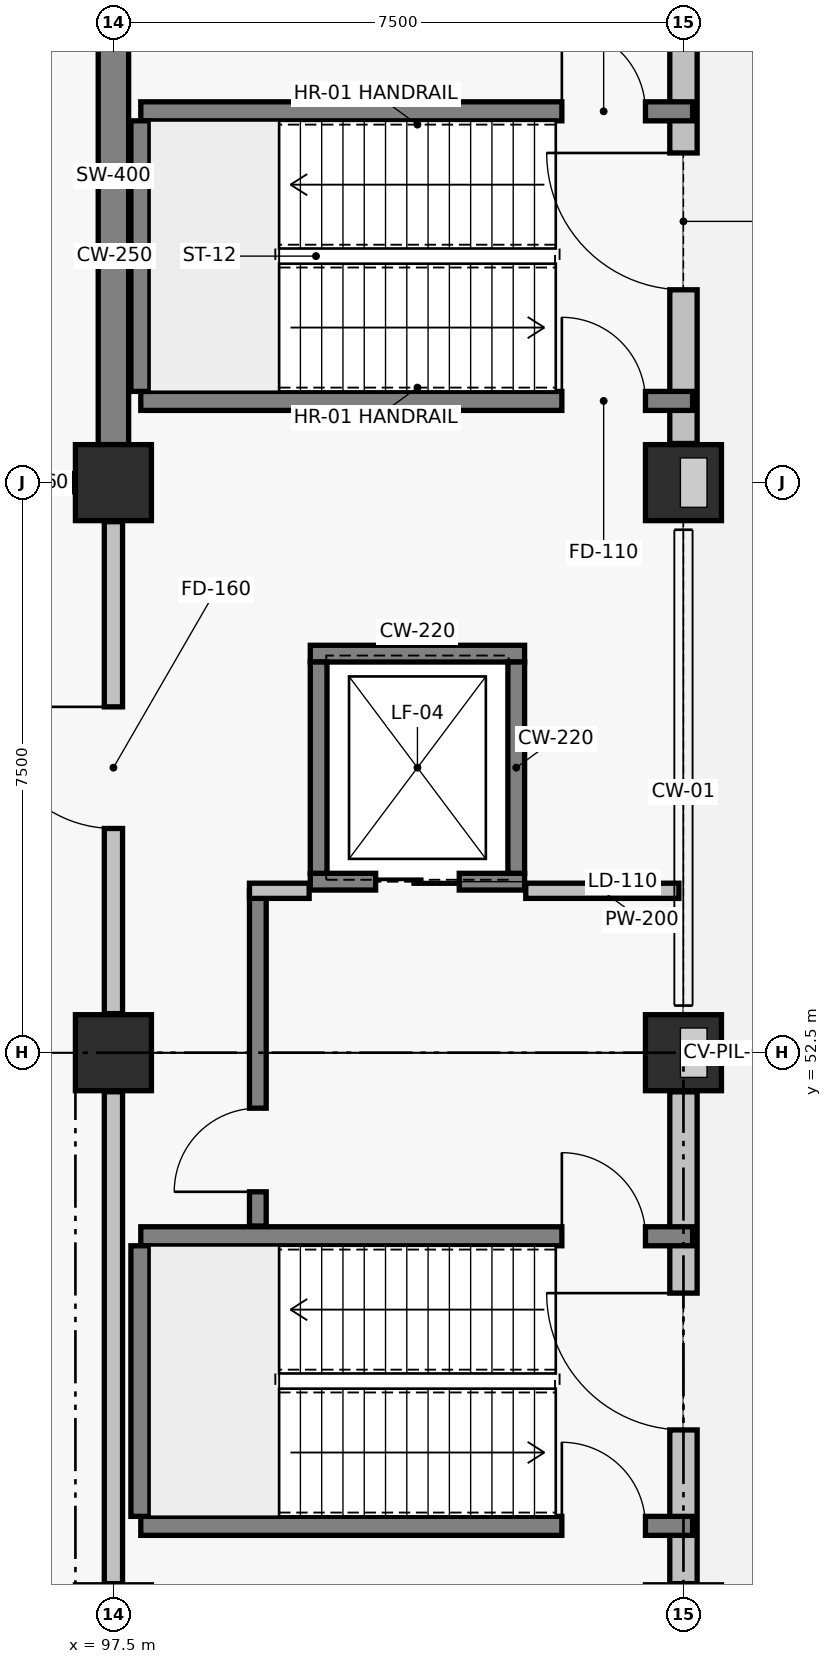
"""IFC4 building model, lengths in metres.
Left out: names, types, materials, properties, quantities, classifications, styles, units other than length and angle.
Written with IfcOpenShell. Run it as: python <this file> out.ifc"""

import sys

from ifc_helpers import new_model, si_unit, direction, frame, frame_2d, origin, origin_2d, place, context, subcontext, project, spatial, rectangle, extrude, element, fill, save


model = new_model("IFC4")
c1 = context("Model", 3, precision=1e-05, world=origin(), true_north=direction((0.0, 1.0)))
c2 = subcontext(c1, "Body", "Model", "MODEL_VIEW")
j1 = project(units=[si_unit("LENGTHUNIT", "METRE"), si_unit("PLANEANGLEUNIT", "RADIAN")], contexts=[c1])
p1 = place(None, origin())
s1 = spatial("IfcSite", under=j1, at=p1, CompositionType="ELEMENT")
p2 = place(p1, origin())
s2 = spatial("IfcBuilding", under=s1, at=p2, CompositionType="ELEMENT")
p3 = place(p2, origin())
s3 = spatial("IfcBuildingStorey", under=s2, at=p3, CompositionType="ELEMENT", Elevation=0.0)
for number, where, z_axis, x_axis in (
    (1, (97.5, 52.5, 0.0), (0.0, 0.0, 1.0), (1.0, 0.0, 0.0)),
    (2, (97.5, 60.0, 0.0), (0.0, 0.0, 1.0), (1.0, 0.0, 0.0)),
    (3, (105.0, 52.5, 0.0), (0.0, 0.0, 1.0), (1.0, 0.0, 0.0)),
    (4, (105.0, 60.0, 0.0), (0.0, 0.0, 1.0), (1.0, 0.0, 0.0)),
):
    element("IfcColumn", number, at=place(p3, frame(where, z_axis=z_axis, x_axis=x_axis)), inside=s3, PredefinedType="COLUMN", context=c2, shape_type="SweptSolid", body=[
        extrude(rectangle(XDim=1.0, YDim=1.0, at=origin_2d()), origin(), (0.0, 0.0, 1.0), 4.8),
    ])
p4 = place(p3, frame((97.5, 60.5, 0.0), z_axis=(0.0, 0.0, 1.0), x_axis=(0.0, 1.0, 0.0)))
e5 = element("IfcWall", 5, at=p4, inside=s3, PredefinedType="SHEAR", context=c2, shape_type="SweptSolid", body=[
    extrude(rectangle(XDim=6.5, YDim=0.4, at=frame_2d((3.25, 0.0))), origin(), (0.0, 0.0, 1.0), 3.6),
])
p5 = place(p3, frame((105.0, 45.515, 0.0), z_axis=(0.0, 0.0, 1.0), x_axis=(0.0, 1.0, 0.0)))
e6 = element("IfcWall", 6, at=p5, inside=s3, PredefinedType="SOLIDWALL", context=c2, shape_type="SweptSolid", body=[
    extrude(rectangle(XDim=6.47, YDim=0.36, at=frame_2d((3.235, 0.0))), origin(), (0.0, 0.0, 1.0), 3.57),
])
p6 = place(p5, frame((2.022, 0.0, 0.0)))
e7 = element("IfcOpeningElement", 7, at=p6, cuts=e6, PredefinedType="OPENING", context=c2, shape_type="SweptSolid", body=[
    extrude(rectangle(XDim=1.8, YDim=2.2, at=frame_2d((0.9, 1.1))), frame((0.0, 0.19, 0.0), z_axis=(0.0, -1.0, 0.0), x_axis=(1.0, 0.0, 0.0)), (0.0, 0.0, 1.0), 0.38),
])
p7 = place(p3, frame((105.0, 60.515, 0.0), z_axis=(0.0, 0.0, 1.0), x_axis=(0.0, 1.0, 0.0)))
e8 = element("IfcWall", 8, at=p7, inside=s3, PredefinedType="SOLIDWALL", context=c2, shape_type="SweptSolid", body=[
    extrude(rectangle(XDim=6.47, YDim=0.36, at=frame_2d((3.235, 0.0))), origin(), (0.0, 0.0, 1.0), 3.57),
])
p8 = place(p7, frame((2.022, 0.0, 0.0)))
e9 = element("IfcOpeningElement", 9, at=p8, cuts=e8, PredefinedType="OPENING", context=c2, shape_type="SweptSolid", body=[
    extrude(rectangle(XDim=1.8, YDim=2.2, at=frame_2d((0.9, 1.1))), frame((0.0, 0.19, 0.0), z_axis=(0.0, -1.0, 0.0), x_axis=(1.0, 0.0, 0.0)), (0.0, 0.0, 1.0), 0.38),
])
p9 = place(p3, frame((97.86, 46.275, 0.0), z_axis=(0.0, 0.0, 1.0), x_axis=(1.0, 0.0, 0.0)))
e10 = element("IfcWall", 10, at=p9, inside=s3, PredefinedType="SOLIDWALL", context=c2, shape_type="SweptSolid", body=[
    extrude(rectangle(XDim=7.26, YDim=0.25, at=frame_2d((3.63, 0.0))), origin(), (0.0, 0.0, 1.0), 4.5),
])
p10 = place(p9, frame((5.54, 0.0, 0.0)))
e11 = element("IfcOpeningElement", 11, at=p10, cuts=e10, PredefinedType="OPENING", context=c2, shape_type="SweptSolid", body=[
    extrude(rectangle(XDim=1.1, YDim=2.15, at=frame_2d((0.55, 1.075))), frame((0.0, 0.135, 0.0), z_axis=(0.0, -1.0, 0.0), x_axis=(1.0, 0.0, 0.0)), (0.0, 0.0, 1.0), 0.27),
])
p11 = place(p3, frame((97.86, 50.085, 0.0), z_axis=(0.0, 0.0, 1.0), x_axis=(1.0, 0.0, 0.0)))
e12 = element("IfcWall", 12, at=p11, inside=s3, PredefinedType="SOLIDWALL", context=c2, shape_type="SweptSolid", body=[
    extrude(rectangle(XDim=7.26, YDim=0.25, at=frame_2d((3.63, 0.0))), origin(), (0.0, 0.0, 1.0), 4.5),
])
p12 = place(p11, frame((5.54, 0.0, 0.0)))
e13 = element("IfcOpeningElement", 13, at=p12, cuts=e12, PredefinedType="OPENING", context=c2, shape_type="SweptSolid", body=[
    extrude(rectangle(XDim=1.1, YDim=2.15, at=frame_2d((0.55, 1.075))), frame((0.0, 0.135, 0.0), z_axis=(0.0, -1.0, 0.0), x_axis=(1.0, 0.0, 0.0)), (0.0, 0.0, 1.0), 0.27),
])
p13 = place(p3, frame((97.855, 46.4, 0.0), z_axis=(0.0, 0.0, 1.0), x_axis=(0.0, 1.0, 0.0)))
e14 = element("IfcWall", 14, at=p13, inside=s3, PredefinedType="SOLIDWALL", context=c2, shape_type="SweptSolid", body=[
    extrude(rectangle(XDim=3.56, YDim=0.25, at=frame_2d((1.78, 0.0))), origin(), (0.0, 0.0, 1.0), 4.5),
])
p14 = place(p3, frame((97.86, 61.075, 0.0), z_axis=(0.0, 0.0, 1.0), x_axis=(1.0, 0.0, 0.0)))
e15 = element("IfcWall", 15, at=p14, inside=s3, PredefinedType="SOLIDWALL", context=c2, shape_type="SweptSolid", body=[
    extrude(rectangle(XDim=7.26, YDim=0.25, at=frame_2d((3.63, 0.0))), origin(), (0.0, 0.0, 1.0), 4.5),
])
p15 = place(p14, frame((5.54, 0.0, 0.0)))
e16 = element("IfcOpeningElement", 16, at=p15, cuts=e15, PredefinedType="OPENING", context=c2, shape_type="SweptSolid", body=[
    extrude(rectangle(XDim=1.1, YDim=2.15, at=frame_2d((0.55, 1.075))), frame((0.0, 0.135, 0.0), z_axis=(0.0, -1.0, 0.0), x_axis=(1.0, 0.0, 0.0)), (0.0, 0.0, 1.0), 0.27),
])
p16 = place(p3, frame((97.86, 64.885, 0.0), z_axis=(0.0, 0.0, 1.0), x_axis=(1.0, 0.0, 0.0)))
e17 = element("IfcWall", 17, at=p16, inside=s3, PredefinedType="SOLIDWALL", context=c2, shape_type="SweptSolid", body=[
    extrude(rectangle(XDim=7.26, YDim=0.25, at=frame_2d((3.63, 0.0))), origin(), (0.0, 0.0, 1.0), 4.5),
])
p17 = place(p16, frame((5.54, 0.0, 0.0)))
e18 = element("IfcOpeningElement", 18, at=p17, cuts=e17, PredefinedType="OPENING", context=c2, shape_type="SweptSolid", body=[
    extrude(rectangle(XDim=1.1, YDim=2.15, at=frame_2d((0.55, 1.075))), frame((0.0, 0.135, 0.0), z_axis=(0.0, -1.0, 0.0), x_axis=(1.0, 0.0, 0.0)), (0.0, 0.0, 1.0), 0.27),
])
p18 = place(p3, frame((97.855, 61.2, 0.0), z_axis=(0.0, 0.0, 1.0), x_axis=(0.0, 1.0, 0.0)))
e19 = element("IfcWall", 19, at=p18, inside=s3, PredefinedType="SOLIDWALL", context=c2, shape_type="SweptSolid", body=[
    extrude(rectangle(XDim=3.56, YDim=0.25, at=frame_2d((1.78, 0.0))), origin(), (0.0, 0.0, 1.0), 4.5),
])
p19 = place(p3, frame((100.09, 54.75, 0.0), z_axis=(0.0, 0.0, 1.0), x_axis=(1.0, 0.0, 0.0)))
e20 = element("IfcWall", 20, at=p19, inside=s3, PredefinedType="SOLIDWALL", context=c2, shape_type="SweptSolid", body=[
    extrude(rectangle(XDim=2.82, YDim=0.22, at=frame_2d((1.41, 0.0))), origin(), (0.0, 0.0, 1.0), 4.5),
])
p20 = place(p19, frame((0.86, 0.0, 0.0)))
e21 = element("IfcOpeningElement", 21, at=p20, cuts=e20, PredefinedType="OPENING", context=c2, shape_type="SweptSolid", body=[
    extrude(rectangle(XDim=1.1, YDim=2.15, at=frame_2d((0.55, 1.075))), frame((0.0, 0.12, 0.0), z_axis=(0.0, -1.0, 0.0), x_axis=(1.0, 0.0, 0.0)), (0.0, 0.0, 1.0), 0.24),
])
p21 = place(p3, frame((100.09, 57.75, 0.0), z_axis=(0.0, 0.0, 1.0), x_axis=(1.0, 0.0, 0.0)))
e22 = element("IfcWall", 22, at=p21, inside=s3, PredefinedType="SOLIDWALL", context=c2, shape_type="SweptSolid", body=[
    extrude(rectangle(XDim=2.82, YDim=0.22, at=frame_2d((1.41, 0.0))), origin(), (0.0, 0.0, 1.0), 4.5),
])
for number, where, z_axis, x_axis in (
    (23, (100.2, 54.86, 0.0), (0.0, 0.0, 1.0), (0.0, 1.0, 0.0)),
    (24, (102.8, 54.86, 0.0), (0.0, 0.0, 1.0), (0.0, 1.0, 0.0)),
):
    element("IfcWall", number, at=place(p3, frame(where, z_axis=z_axis, x_axis=x_axis)), inside=s3, PredefinedType="SOLIDWALL", context=c2, shape_type="SweptSolid", body=[
        extrude(rectangle(XDim=2.78, YDim=0.22, at=frame_2d((1.39, 0.0))), origin(), (0.0, 0.0, 1.0), 4.5),
    ])
p22 = place(p3, frame((99.4, 50.22, 0.0), z_axis=(0.0, 0.0, 1.0), x_axis=(0.0, 1.0, 0.0)))
e25 = element("IfcWall", 25, at=p22, inside=s3, PredefinedType="SOLIDWALL", context=c2, shape_type="SweptSolid", body=[
    extrude(rectangle(XDim=4.41, YDim=0.22, at=frame_2d((2.205, 0.0))), origin(), (0.0, 0.0, 1.0), 4.5),
])
p23 = place(p22, frame((0.45, 0.0, 0.0)))
e26 = element("IfcOpeningElement", 26, at=p23, cuts=e25, PredefinedType="OPENING", context=c2, shape_type="SweptSolid", body=[
    extrude(rectangle(XDim=1.1, YDim=2.15, at=frame_2d((0.55, 1.075))), frame((0.0, 0.12, 0.0), z_axis=(0.0, -1.0, 0.0), x_axis=(1.0, 0.0, 0.0)), (0.0, 0.0, 1.0), 0.24),
])
p24 = place(p3, frame((99.29, 54.63, 0.0), z_axis=(0.0, 0.0, 1.0), x_axis=(1.0, 0.0, 0.0)))
e27 = element("IfcWall", 27, at=p24, inside=s3, PredefinedType="PARTITIONING", context=c2, shape_type="SweptSolid", body=[
    extrude(rectangle(XDim=0.785, YDim=0.2, at=frame_2d((0.393, 0.0))), origin(), (0.0, 0.0, 1.0), 4.48),
])
p25 = place(p3, frame((102.925, 54.63, 0.0), z_axis=(0.0, 0.0, 1.0), x_axis=(1.0, 0.0, 0.0)))
e28 = element("IfcWall", 28, at=p25, inside=s3, PredefinedType="PARTITIONING", context=c2, shape_type="SweptSolid", body=[
    extrude(rectangle(XDim=2.015, YDim=0.2, at=frame_2d((1.007, 0.0))), origin(), (0.0, 0.0, 1.0), 3.73),
])
p26 = place(p3, frame((90.464, 60.0, 0.0), z_axis=(0.0, 0.0, 1.0), x_axis=(1.0, 0.0, 0.0)))
e29 = element("IfcWall", 29, at=p26, inside=s3, PredefinedType="PARTITIONING", context=c2, shape_type="SweptSolid", body=[
    extrude(rectangle(XDim=6.522, YDim=0.24, at=frame_2d((3.261, 0.0))), origin(), (0.0, 0.0, 1.0), 2.97),
])
p27 = place(p26, frame((2.486, 0.0, 0.0)))
e30 = element("IfcOpeningElement", 30, at=p27, cuts=e29, PredefinedType="OPENING", context=c2, shape_type="SweptSolid", body=[
    extrude(rectangle(XDim=1.6, YDim=2.15, at=frame_2d((0.8, 1.075))), frame((0.0, 0.13, 0.0), z_axis=(0.0, -1.0, 0.0), x_axis=(1.0, 0.0, 0.0)), (0.0, 0.0, 1.0), 0.26),
])
p28 = place(p3, frame((97.5, 45.514, 0.0), z_axis=(0.0, 0.0, 1.0), x_axis=(0.0, 1.0, 0.0)))
e31 = element("IfcWall", 31, at=p28, inside=s3, PredefinedType="PARTITIONING", context=c2, shape_type="SweptSolid", body=[
    extrude(rectangle(XDim=6.472, YDim=0.24, at=frame_2d((3.236, 0.0))), origin(), (0.0, 0.0, 1.0), 3.57),
])
p29 = place(p3, frame((97.5, 53.014, 0.0), z_axis=(0.0, 0.0, 1.0), x_axis=(0.0, 1.0, 0.0)))
e32 = element("IfcWall", 32, at=p29, inside=s3, PredefinedType="PARTITIONING", context=c2, shape_type="SweptSolid", body=[
    extrude(rectangle(XDim=6.472, YDim=0.24, at=frame_2d((3.236, 0.0))), origin(), (0.0, 0.0, 1.0), 3.57),
])
p30 = place(p29, frame((2.436, 0.0, 0.0)))
e33 = element("IfcOpeningElement", 33, at=p30, cuts=e32, PredefinedType="OPENING", context=c2, shape_type="SweptSolid", body=[
    extrude(rectangle(XDim=1.6, YDim=2.15, at=frame_2d((0.8, 1.075))), frame((0.0, 0.13, 0.0), z_axis=(0.0, -1.0, 0.0), x_axis=(1.0, 0.0, 0.0)), (0.0, 0.0, 1.0), 0.26),
])
p31 = place(p6, frame((1.8, 0.0, 0.0), z_axis=(0.0, 0.0, 1.0), x_axis=(-1.0, 0.0, 0.0)))
e34 = element("IfcDoor", 34, at=p31, inside=s3, OperationType="SINGLE_SWING_LEFT", PredefinedType="DOOR", context=c2, shape_type="SweptSolid", body=[
    extrude(rectangle(XDim=1.8, YDim=2.2, at=frame_2d((0.9, 1.1))), frame((0.0, 0.025, 0.0), z_axis=(0.0, -1.0, 0.0), x_axis=(1.0, 0.0, 0.0)), (0.0, 0.0, 1.0), 0.05),
])
fill(e7, e34)
p32 = place(p8, frame((1.8, 0.0, 0.0), z_axis=(0.0, 0.0, 1.0), x_axis=(-1.0, 0.0, 0.0)))
e35 = element("IfcDoor", 35, at=p32, inside=s3, OperationType="SINGLE_SWING_LEFT", PredefinedType="DOOR", context=c2, shape_type="SweptSolid", body=[
    extrude(rectangle(XDim=1.8, YDim=2.2, at=frame_2d((0.9, 1.1))), frame((0.0, 0.025, 0.0), z_axis=(0.0, -1.0, 0.0), x_axis=(1.0, 0.0, 0.0)), (0.0, 0.0, 1.0), 0.05),
])
fill(e9, e35)
p33 = place(p10, origin())
e36 = element("IfcDoor", 36, at=p33, inside=s3, OperationType="SINGLE_SWING_LEFT", PredefinedType="DOOR", context=c2, shape_type="SweptSolid", body=[
    extrude(rectangle(XDim=1.1, YDim=2.15, at=frame_2d((0.55, 1.075))), frame((0.0, 0.025, 0.0), z_axis=(0.0, -1.0, 0.0), x_axis=(1.0, 0.0, 0.0)), (0.0, 0.0, 1.0), 0.05),
])
fill(e11, e36)
p34 = place(p12, frame((1.1, 0.0, 0.0), z_axis=(0.0, 0.0, 1.0), x_axis=(-1.0, 0.0, 0.0)))
e37 = element("IfcDoor", 37, at=p34, inside=s3, OperationType="SINGLE_SWING_RIGHT", PredefinedType="DOOR", context=c2, shape_type="SweptSolid", body=[
    extrude(rectangle(XDim=1.1, YDim=2.15, at=frame_2d((0.55, 1.075))), frame((0.0, 0.025, 0.0), z_axis=(0.0, -1.0, 0.0), x_axis=(1.0, 0.0, 0.0)), (0.0, 0.0, 1.0), 0.05),
])
fill(e13, e37)
p35 = place(p15, origin())
e38 = element("IfcDoor", 38, at=p35, inside=s3, OperationType="SINGLE_SWING_LEFT", PredefinedType="DOOR", context=c2, shape_type="SweptSolid", body=[
    extrude(rectangle(XDim=1.1, YDim=2.15, at=frame_2d((0.55, 1.075))), frame((0.0, 0.025, 0.0), z_axis=(0.0, -1.0, 0.0), x_axis=(1.0, 0.0, 0.0)), (0.0, 0.0, 1.0), 0.05),
])
fill(e16, e38)
p36 = place(p17, frame((1.1, 0.0, 0.0), z_axis=(0.0, 0.0, 1.0), x_axis=(-1.0, 0.0, 0.0)))
e39 = element("IfcDoor", 39, at=p36, inside=s3, OperationType="SINGLE_SWING_RIGHT", PredefinedType="DOOR", context=c2, shape_type="SweptSolid", body=[
    extrude(rectangle(XDim=1.1, YDim=2.15, at=frame_2d((0.55, 1.075))), frame((0.0, 0.025, 0.0), z_axis=(0.0, -1.0, 0.0), x_axis=(1.0, 0.0, 0.0)), (0.0, 0.0, 1.0), 0.05),
])
fill(e18, e39)
p37 = place(p20, origin())
e40 = element("IfcDoor", 40, at=p37, inside=s3, OperationType="SLIDING_TO_LEFT", PredefinedType="DOOR", context=c2, shape_type="SweptSolid", body=[
    extrude(rectangle(XDim=1.1, YDim=2.15, at=frame_2d((0.55, 1.075))), frame((0.0, 0.025, 0.0), z_axis=(0.0, -1.0, 0.0), x_axis=(1.0, 0.0, 0.0)), (0.0, 0.0, 1.0), 0.05),
])
fill(e21, e40)
p38 = place(p23, origin())
e41 = element("IfcDoor", 41, at=p38, inside=s3, OperationType="SINGLE_SWING_LEFT", PredefinedType="DOOR", context=c2, shape_type="SweptSolid", body=[
    extrude(rectangle(XDim=1.1, YDim=2.15, at=frame_2d((0.55, 1.075))), frame((0.0, 0.025, 0.0), z_axis=(0.0, -1.0, 0.0), x_axis=(1.0, 0.0, 0.0)), (0.0, 0.0, 1.0), 0.05),
])
fill(e26, e41)
p39 = place(p30, origin())
e42 = element("IfcDoor", 42, at=p39, inside=s3, OperationType="SINGLE_SWING_RIGHT", PredefinedType="DOOR", context=c2, shape_type="SweptSolid", body=[
    extrude(rectangle(XDim=1.6, YDim=2.15, at=frame_2d((0.8, 1.075))), frame((0.0, 0.025, 0.0), z_axis=(0.0, -1.0, 0.0), x_axis=(1.0, 0.0, 0.0)), (0.0, 0.0, 1.0), 0.05),
])
fill(e33, e42)
save(model, sys.argv[1])
